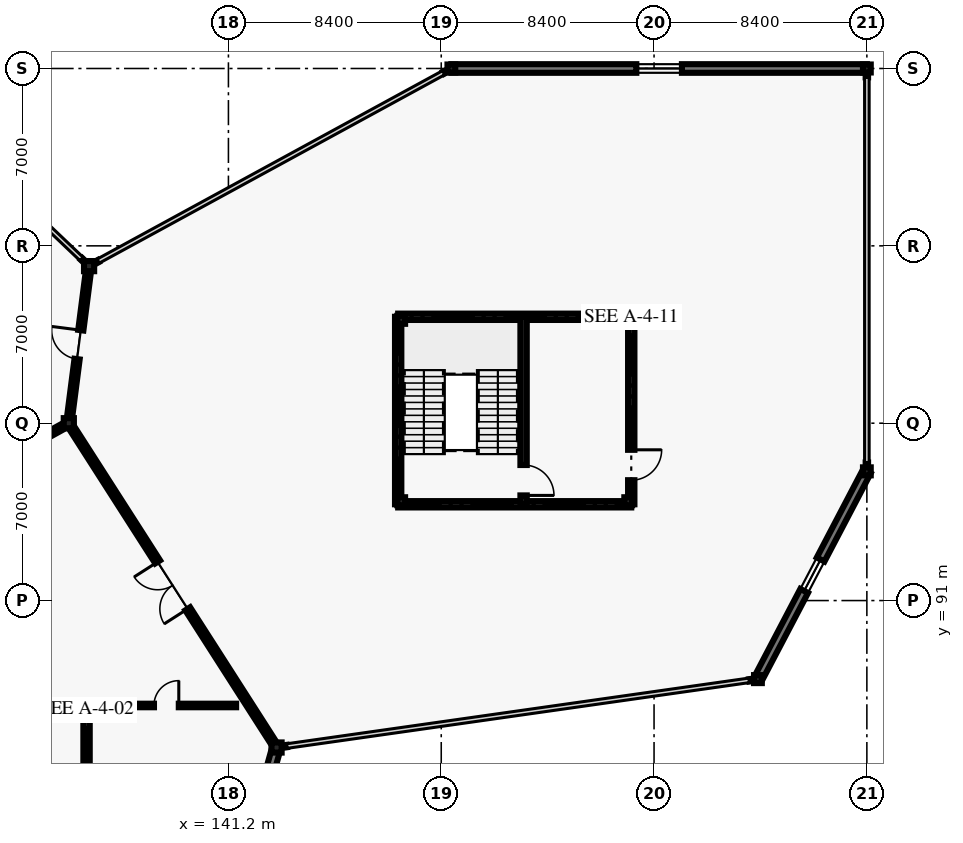
"""IFC4 building model, lengths in metres.
Left out: names, types, materials, properties, quantities, classifications, styles, units other than length and angle.
Written with IfcOpenShell. Run it as: python <this file> out.ifc"""

import sys

from ifc_helpers import new_model, si_unit, direction, frame, frame_2d, origin, origin_2d, place, context, subcontext, project, spatial, rectangle, i_section, extrude, element, fill, save


model = new_model("IFC4")
c1 = context("Model", 3, precision=1e-05, world=origin(), true_north=direction((0.0, 1.0)))
c2 = subcontext(c1, "Body", "Model", "MODEL_VIEW")
j1 = project(units=[si_unit("LENGTHUNIT", "METRE"), si_unit("PLANEANGLEUNIT", "RADIAN")], contexts=[c1])
p1 = place(None, origin())
s1 = spatial("IfcSite", under=j1, at=p1, CompositionType="ELEMENT")
p2 = place(p1, origin())
s2 = spatial("IfcBuilding", under=s1, at=p2, CompositionType="ELEMENT")
p3 = place(p2, frame((0.0, 0.0, 5.4)))
s3 = spatial("IfcBuildingStorey", under=s2, at=p3, CompositionType="ELEMENT", Elevation=5.4)
for number, where, z_axis, x_axis in (
    (1, (134.9, 98.0, 0.0), (0.0, 0.0, 1.0), (1.0, 0.0, 0.0)),
    (2, (135.7, 104.2, 0.0), (0.0, 0.0, 1.0), (1.0, 0.0, 0.0)),
    (3, (143.1, 85.2, 0.0), (0.0, 0.0, 1.0), (1.0, 0.0, 0.0)),
):
    element("IfcColumn", number, at=place(p3, frame(where, z_axis=z_axis, x_axis=x_axis)), inside=s3, PredefinedType="COLUMN", context=c2, shape_type="SweptSolid", body=[
        extrude(i_section(OverallWidth=0.4, OverallDepth=0.4, WebThickness=0.022, FlangeThickness=0.036, at=origin_2d()), origin(), (0.0, 0.0, 1.0), 4.8),
    ])
for number, where, z_axis, x_axis in (
    (4, (150.0, 112.0, 0.0), (0.0, 0.0, 1.0), (1.0, 0.0, 0.0)),
    (5, (162.1, 87.9, 0.0), (0.0, 0.0, 1.0), (1.0, 0.0, 0.0)),
    (6, (166.4, 96.1, 0.0), (0.0, 0.0, 1.0), (1.0, 0.0, 0.0)),
    (7, (166.4, 112.0, 0.0), (0.0, 0.0, 1.0), (1.0, 0.0, 0.0)),
):
    element("IfcColumn", number, at=place(p3, frame(where, z_axis=z_axis, x_axis=x_axis)), inside=s3, PredefinedType="COLUMN", context=c2, shape_type="SweptSolid", body=[
        extrude(i_section(OverallWidth=0.307, OverallDepth=0.315, WebThickness=0.012, FlangeThickness=0.019, FilletRadius=0.017, at=origin_2d()), origin(), (0.0, 0.0, 1.0), 4.8),
    ])
p4 = place(p3, frame((135.48, 86.58, 0.0), z_axis=(0.0, 0.0, 1.0), x_axis=(1.0, 0.0, 0.0)))
e8 = element("IfcColumn", 8, at=p4, inside=s3, PredefinedType="COLUMN", context=c2, shape_type="SweptSolid", body=[
    extrude(i_section(OverallWidth=0.4, OverallDepth=0.4, WebThickness=0.022, FlangeThickness=0.036, at=origin_2d()), origin(), (0.0, 0.0, 1.0), 4.8),
])
for number, where, z_axis, x_axis in (
    (9, (148.02, 94.92, 0.0), (0.0, 0.0, 1.0), (1.0, 0.0, 0.0)),
    (10, (156.98, 94.92, 0.0), (0.0, 0.0, 1.0), (1.0, 0.0, 0.0)),
    (11, (156.98, 102.08, 0.0), (0.0, 0.0, 1.0), (1.0, 0.0, 0.0)),
    (12, (148.02, 102.08, 0.0), (0.0, 0.0, 1.0), (1.0, 0.0, 0.0)),
):
    element("IfcColumn", number, at=place(p3, frame(where, z_axis=z_axis, x_axis=x_axis)), inside=s3, PredefinedType="COLUMN", context=c2, shape_type="SweptSolid", body=[
        extrude(i_section(OverallWidth=0.307, OverallDepth=0.315, WebThickness=0.012, FlangeThickness=0.019, FilletRadius=0.017, at=origin_2d()), origin(), (0.0, 0.0, 1.0), 4.8),
    ])
p5 = place(p3, frame((143.084, 85.142, 0.0), z_axis=(0.0, 0.0, 1.0), x_axis=(-0.268810029922, -0.963193214165, 0.0)))
e13 = element("IfcWall", 13, at=p5, inside=s3, PredefinedType="SOLIDWALL", context=c2, shape_type="SweptSolid", body=[
    extrude(rectangle(XDim=13.333, YDim=0.34, at=frame_2d((6.667, 0.0))), origin(), (0.0, 0.0, 1.0), 3.62),
])
p6 = place(p3, frame((135.403, 104.482, 0.0), z_axis=(0.0, 0.0, 1.0), x_axis=(0.726243974232, -0.687437044311, 0.0)))
e14 = element("IfcWall", 14, at=p6, inside=s3, PredefinedType="SOLIDWALL", context=c2, shape_type="SweptSolid", body=[
    extrude(rectangle(XDim=0.308, YDim=0.095, at=frame_2d((0.154, 0.0))), origin(), (0.0, 0.0, 1.0), 3.62),
])
for number, where, z_axis, x_axis in (
    (15, (162.058, 87.894, 0.0), (0.0, 0.0, 1.0), (-0.99, -0.139, 0.0)),
    (16, (143.506, 85.257, 0.0), (0.0, 0.0, 1.0), (-0.99, -0.139, 0.0)),
):
    element("IfcWall", number, at=place(p3, frame(where, z_axis=z_axis, x_axis=x_axis)), inside=s3, PredefinedType="SOLIDWALL", context=c2, shape_type="SweptSolid", body=[
        extrude(rectangle(XDim=0.308, YDim=0.095, at=frame_2d((0.154, 0.0))), origin(), (0.0, 0.0, 1.0), 3.62),
    ])
p7 = place(p3, frame((166.4, 96.1, 0.0), z_axis=(0.0, 0.0, 1.0), x_axis=(-0.464385293852, -0.885633275602, 0.0)))
e17 = element("IfcWall", 17, at=p7, inside=s3, PredefinedType="SOLIDWALL", context=c2, shape_type="SweptSolid", body=[
    extrude(rectangle(XDim=9.259, YDim=0.34, at=frame_2d((4.629, 0.0))), origin(), (0.0, 0.0, 1.0), 3.62),
])
p8 = place(p7, frame((3.929, 0.0, 0.95)))
e18 = element("IfcOpeningElement", 18, at=p8, cuts=e17, PredefinedType="OPENING", context=c2, shape_type="SweptSolid", body=[
    extrude(rectangle(XDim=1.4, YDim=2.1, at=frame_2d((0.7, 1.05))), frame((0.0, 0.18, 0.0), z_axis=(0.0, -1.0, 0.0), x_axis=(1.0, 0.0, 0.0)), (0.0, 0.0, 1.0), 0.36),
])
p9 = place(p3, frame((166.4, 111.958, 0.0), z_axis=(0.0, 0.0, 1.0), x_axis=(0.0, -1.0, 0.0)))
e19 = element("IfcWall", 19, at=p9, inside=s3, PredefinedType="SOLIDWALL", context=c2, shape_type="SweptSolid", body=[
    extrude(rectangle(XDim=0.308, YDim=0.095, at=frame_2d((0.154, 0.0))), origin(), (0.0, 0.0, 1.0), 3.62),
])
p10 = place(p3, frame((166.4, 96.45, 0.0), z_axis=(0.0, 0.0, 1.0), x_axis=(0.0, -1.0, 0.0)))
e20 = element("IfcWall", 20, at=p10, inside=s3, PredefinedType="SOLIDWALL", context=c2, shape_type="SweptSolid", body=[
    extrude(rectangle(XDim=0.308, YDim=0.095, at=frame_2d((0.154, 0.0))), origin(), (0.0, 0.0, 1.0), 3.62),
])
p11 = place(p3, frame((150.0, 112.0, 0.0), z_axis=(0.0, 0.0, 1.0), x_axis=(1.0, 0.0, 0.0)))
e21 = element("IfcWall", 21, at=p11, inside=s3, PredefinedType="SOLIDWALL", context=c2, shape_type="SweptSolid", body=[
    extrude(rectangle(XDim=16.4, YDim=0.34, at=frame_2d((8.2, 0.0))), origin(), (0.0, 0.0, 1.0), 3.62),
])
p12 = place(p11, frame((7.3, 0.0, 0.95)))
e22 = element("IfcOpeningElement", 22, at=p12, cuts=e21, PredefinedType="OPENING", context=c2, shape_type="SweptSolid", body=[
    extrude(rectangle(XDim=1.8, YDim=2.1, at=frame_2d((0.9, 1.05))), frame((0.0, 0.18, 0.0), z_axis=(0.0, -1.0, 0.0), x_axis=(1.0, 0.0, 0.0)), (0.0, 0.0, 1.0), 0.36),
])
p13 = place(p3, frame((135.79, 104.249, 0.0), z_axis=(0.0, 0.0, 1.0), x_axis=(0.876984894636, 0.480517944077, 0.0)))
e23 = element("IfcWall", 23, at=p13, inside=s3, PredefinedType="SOLIDWALL", context=c2, shape_type="SweptSolid", body=[
    extrude(rectangle(XDim=0.308, YDim=0.095, at=frame_2d((0.154, 0.0))), origin(), (0.0, 0.0, 1.0), 3.62),
])
p14 = place(p3, frame((149.693, 111.832, 0.0), z_axis=(0.0, 0.0, 1.0), x_axis=(0.876801617046, 0.480852289529, 0.0)))
e24 = element("IfcWall", 24, at=p14, inside=s3, PredefinedType="SOLIDWALL", context=c2, shape_type="SweptSolid", body=[
    extrude(rectangle(XDim=0.308, YDim=0.095, at=frame_2d((0.154, 0.0))), origin(), (0.0, 0.0, 1.0), 3.62),
])
p15 = place(p3, frame((134.9, 98.0, 0.0), z_axis=(0.0, 0.0, 1.0), x_axis=(-0.875181353329, -0.483794996652, 0.0)))
e25 = element("IfcWall", 25, at=p15, inside=s3, PredefinedType="SOLIDWALL", context=c2, shape_type="SweptSolid", body=[
    extrude(rectangle(XDim=18.396, YDim=0.225, at=frame_2d((9.198, 0.0))), origin(), (0.0, 0.0, 1.0), 4.02),
])
p16 = place(p15, frame((8.273, 0.0, 0.0)))
e26 = element("IfcOpeningElement", 26, at=p16, cuts=e25, PredefinedType="OPENING", context=c2, shape_type="SweptSolid", body=[
    extrude(rectangle(XDim=1.85, YDim=2.4, at=frame_2d((0.925, 1.2))), frame((0.0, 0.123, 0.0), z_axis=(0.0, -1.0, 0.0), x_axis=(1.0, 0.0, 0.0)), (0.0, 0.0, 1.0), 0.245),
])
p17 = place(p3, frame((143.1, 85.2, 0.0), z_axis=(0.0, 0.0, 1.0), x_axis=(-0.539434641352, 0.842027474439, 0.0)))
e27 = element("IfcWall", 27, at=p17, inside=s3, PredefinedType="SOLIDWALL", context=c2, shape_type="SweptSolid", body=[
    extrude(rectangle(XDim=15.201, YDim=0.225, at=frame_2d((7.601, 0.0))), origin(), (0.0, 0.0, 1.0), 4.02),
])
p18 = place(p17, frame((6.501, 0.0, 0.0)))
e28 = element("IfcOpeningElement", 28, at=p18, cuts=e27, PredefinedType="OPENING", context=c2, shape_type="SweptSolid", body=[
    extrude(rectangle(XDim=2.2, YDim=2.6, at=frame_2d((1.1, 1.3))), frame((0.0, 0.123, 0.0), z_axis=(0.0, -1.0, 0.0), x_axis=(1.0, 0.0, 0.0)), (0.0, 0.0, 1.0), 0.245),
])
p19 = place(p3, frame((134.9, 98.0, 0.0), z_axis=(0.0, 0.0, 1.0), x_axis=(0.127980011854, 0.991776747341, 0.0)))
e29 = element("IfcWall", 29, at=p19, inside=s3, PredefinedType="SOLIDWALL", context=c2, shape_type="SweptSolid", body=[
    extrude(rectangle(XDim=6.251, YDim=0.205, at=frame_2d((3.126, 0.0))), origin(), (0.0, 0.0, 1.0), 3.32),
])
p20 = place(p19, frame((2.551, 0.0, 0.0)))
e30 = element("IfcOpeningElement", 30, at=p20, cuts=e29, PredefinedType="OPENING", context=c2, shape_type="SweptSolid", body=[
    extrude(rectangle(XDim=1.15, YDim=2.2, at=frame_2d((0.575, 1.1))), frame((0.0, 0.113, 0.0), z_axis=(0.0, -1.0, 0.0), x_axis=(1.0, 0.0, 0.0)), (0.0, 0.0, 1.0), 0.225),
])
p21 = place(p3, frame((136.0, 86.859, 0.0), z_axis=(0.0, 0.0, 1.0), x_axis=(1.0, 0.0, 0.0)))
e31 = element("IfcWall", 31, at=p21, inside=s3, PredefinedType="PARTITIONING", context=c2, shape_type="SweptSolid", body=[
    extrude(rectangle(XDim=5.503, YDim=0.14, at=frame_2d((2.751, 0.0))), origin(), (0.0, 0.0, 1.0), 3.32),
])
p22 = place(p21, frame((2.261, 0.0, 0.0)))
e32 = element("IfcOpeningElement", 32, at=p22, cuts=e31, PredefinedType="OPENING", context=c2, shape_type="SweptSolid", body=[
    extrude(rectangle(XDim=0.98, YDim=2.15, at=frame_2d((0.49, 1.075))), frame((0.0, 0.08, 0.0), z_axis=(0.0, -1.0, 0.0), x_axis=(1.0, 0.0, 0.0)), (0.0, 0.0, 1.0), 0.16),
])
p23 = place(p3, frame((126.4, 86.7, 0.0), z_axis=(0.0, 0.0, 1.0), x_axis=(1.0, 0.0, 0.0)))
e33 = element("IfcWall", 33, at=p23, inside=s3, PredefinedType="SHEAR", context=c2, shape_type="SweptSolid", body=[
    extrude(rectangle(XDim=9.2, YDim=0.25, at=frame_2d((4.6, 0.0))), origin(), (0.0, 0.0, 1.0), 4.56),
])
p24 = place(p3, frame((135.6, 86.7, 0.0), z_axis=(0.0, 0.0, 1.0), x_axis=(0.0, -1.0, 0.0)))
e34 = element("IfcWall", 34, at=p24, inside=s3, PredefinedType="SHEAR", context=c2, shape_type="SweptSolid", body=[
    extrude(rectangle(XDim=7.4, YDim=0.25, at=frame_2d((3.7, 0.0))), origin(), (0.0, 0.0, 1.0), 4.56),
])
p25 = place(p24, frame((5.25, 0.0, 0.0)))
e35 = element("IfcOpeningElement", 35, at=p25, cuts=e34, PredefinedType="OPENING", context=c2, shape_type="SweptSolid", body=[
    extrude(rectangle(XDim=1.2, YDim=2.2, at=frame_2d((0.6, 1.1))), frame((0.0, 0.135, 0.0), z_axis=(0.0, -1.0, 0.0), x_axis=(1.0, 0.0, 0.0)), (0.0, 0.0, 1.0), 0.27),
])
p26 = place(p3, frame((147.9, 94.8, 0.0), z_axis=(0.0, 0.0, 1.0), x_axis=(0.0, 1.0, 0.0)))
e36 = element("IfcWall", 36, at=p26, inside=s3, PredefinedType="SHEAR", context=c2, shape_type="SweptSolid", body=[
    extrude(rectangle(XDim=7.4, YDim=0.25, at=frame_2d((3.7, 0.0))), origin(), (0.0, 0.0, 1.0), 4.56),
])
for number, where, z_axis, x_axis in (
    (37, (147.9, 102.2, 0.0), (0.0, 0.0, 1.0), (1.0, 0.0, 0.0)),
    (38, (157.1, 94.8, 0.0), (0.0, 0.0, 1.0), (-1.0, 0.0, 0.0)),
):
    element("IfcWall", number, at=place(p3, frame(where, z_axis=z_axis, x_axis=x_axis)), inside=s3, PredefinedType="SHEAR", context=c2, shape_type="SweptSolid", body=[
        extrude(rectangle(XDim=9.2, YDim=0.25, at=frame_2d((4.6, 0.0))), origin(), (0.0, 0.0, 1.0), 4.56),
    ])
p27 = place(p3, frame((157.1, 102.2, 0.0), z_axis=(0.0, 0.0, 1.0), x_axis=(0.0, -1.0, 0.0)))
e39 = element("IfcWall", 39, at=p27, inside=s3, PredefinedType="SHEAR", context=c2, shape_type="SweptSolid", body=[
    extrude(rectangle(XDim=7.4, YDim=0.25, at=frame_2d((3.7, 0.0))), origin(), (0.0, 0.0, 1.0), 4.56),
])
p28 = place(p27, frame((5.25, 0.0, 0.0)))
e40 = element("IfcOpeningElement", 40, at=p28, cuts=e39, PredefinedType="OPENING", context=c2, shape_type="SweptSolid", body=[
    extrude(rectangle(XDim=1.2, YDim=2.2, at=frame_2d((0.6, 1.1))), frame((0.0, 0.135, 0.0), z_axis=(0.0, -1.0, 0.0), x_axis=(1.0, 0.0, 0.0)), (0.0, 0.0, 1.0), 0.27),
])
p29 = place(p3, frame((152.85, 102.2, 0.0), z_axis=(0.0, 0.0, 1.0), x_axis=(0.0, -1.0, 0.0)))
e41 = element("IfcWall", 41, at=p29, inside=s3, PredefinedType="SHEAR", context=c2, shape_type="SweptSolid", body=[
    extrude(rectangle(XDim=7.4, YDim=0.25, at=frame_2d((3.7, 0.0))), origin(), (0.0, 0.0, 1.0), 4.56),
])
p30 = place(p29, frame((5.85, 0.0, 0.0)))
e42 = element("IfcOpeningElement", 42, at=p30, cuts=e41, PredefinedType="OPENING", context=c2, shape_type="SweptSolid", body=[
    extrude(rectangle(XDim=1.2, YDim=2.2, at=frame_2d((0.6, 1.1))), frame((0.0, 0.135, 0.0), z_axis=(0.0, -1.0, 0.0), x_axis=(1.0, 0.0, 0.0)), (0.0, 0.0, 1.0), 0.27),
])
p31 = place(p8, origin())
e43 = element("IfcWindow", 43, at=p31, inside=s3, PartitioningType="SINGLE_PANEL", PredefinedType="WINDOW", context=c2, shape_type="SweptSolid", body=[
    extrude(rectangle(XDim=1.4, YDim=2.1, at=frame_2d((0.7, 1.05))), frame((0.0, 0.03, 0.0), z_axis=(0.0, -1.0, 0.0), x_axis=(1.0, 0.0, 0.0)), (0.0, 0.0, 1.0), 0.06),
])
fill(e18, e43)
p32 = place(p12, origin())
e44 = element("IfcWindow", 44, at=p32, inside=s3, PartitioningType="SINGLE_PANEL", PredefinedType="WINDOW", context=c2, shape_type="SweptSolid", body=[
    extrude(rectangle(XDim=1.8, YDim=2.1, at=frame_2d((0.9, 1.05))), frame((0.0, 0.03, 0.0), z_axis=(0.0, -1.0, 0.0), x_axis=(1.0, 0.0, 0.0)), (0.0, 0.0, 1.0), 0.06),
])
fill(e22, e44)
p33 = place(p18, origin())
e45 = element("IfcDoor", 45, at=p33, inside=s3, OperationType="DOUBLE_DOOR_SINGLE_SWING", PredefinedType="DOOR", context=c2, shape_type="SweptSolid", body=[
    extrude(rectangle(XDim=2.2, YDim=2.6, at=frame_2d((1.1, 1.3))), frame((0.0, 0.025, 0.0), z_axis=(0.0, -1.0, 0.0), x_axis=(1.0, 0.0, 0.0)), (0.0, 0.0, 1.0), 0.05),
])
fill(e28, e45)
p34 = place(p20, origin())
e46 = element("IfcDoor", 46, at=p34, inside=s3, OperationType="SINGLE_SWING_RIGHT", PredefinedType="DOOR", context=c2, shape_type="SweptSolid", body=[
    extrude(rectangle(XDim=1.15, YDim=2.2, at=frame_2d((0.575, 1.1))), frame((0.0, 0.025, 0.0), z_axis=(0.0, -1.0, 0.0), x_axis=(1.0, 0.0, 0.0)), (0.0, 0.0, 1.0), 0.05),
])
fill(e30, e46)
p35 = place(p22, origin())
e47 = element("IfcDoor", 47, at=p35, inside=s3, OperationType="SINGLE_SWING_RIGHT", PredefinedType="DOOR", context=c2, shape_type="SweptSolid", body=[
    extrude(rectangle(XDim=0.98, YDim=2.15, at=frame_2d((0.49, 1.075))), frame((0.0, 0.025, 0.0), z_axis=(0.0, -1.0, 0.0), x_axis=(1.0, 0.0, 0.0)), (0.0, 0.0, 1.0), 0.05),
])
fill(e32, e47)
p36 = place(p28, origin())
e48 = element("IfcDoor", 48, at=p36, inside=s3, OperationType="SINGLE_SWING_LEFT", PredefinedType="DOOR", context=c2, shape_type="SweptSolid", body=[
    extrude(rectangle(XDim=1.2, YDim=2.2, at=frame_2d((0.6, 1.1))), frame((0.0, 0.025, 0.0), z_axis=(0.0, -1.0, 0.0), x_axis=(1.0, 0.0, 0.0)), (0.0, 0.0, 1.0), 0.05),
])
fill(e40, e48)
p37 = place(p30, origin())
e49 = element("IfcDoor", 49, at=p37, inside=s3, OperationType="SINGLE_SWING_RIGHT", PredefinedType="DOOR", context=c2, shape_type="SweptSolid", body=[
    extrude(rectangle(XDim=1.2, YDim=2.2, at=frame_2d((0.6, 1.1))), frame((0.0, 0.025, 0.0), z_axis=(0.0, -1.0, 0.0), x_axis=(1.0, 0.0, 0.0)), (0.0, 0.0, 1.0), 0.05),
])
fill(e42, e49)
save(model, sys.argv[1])
